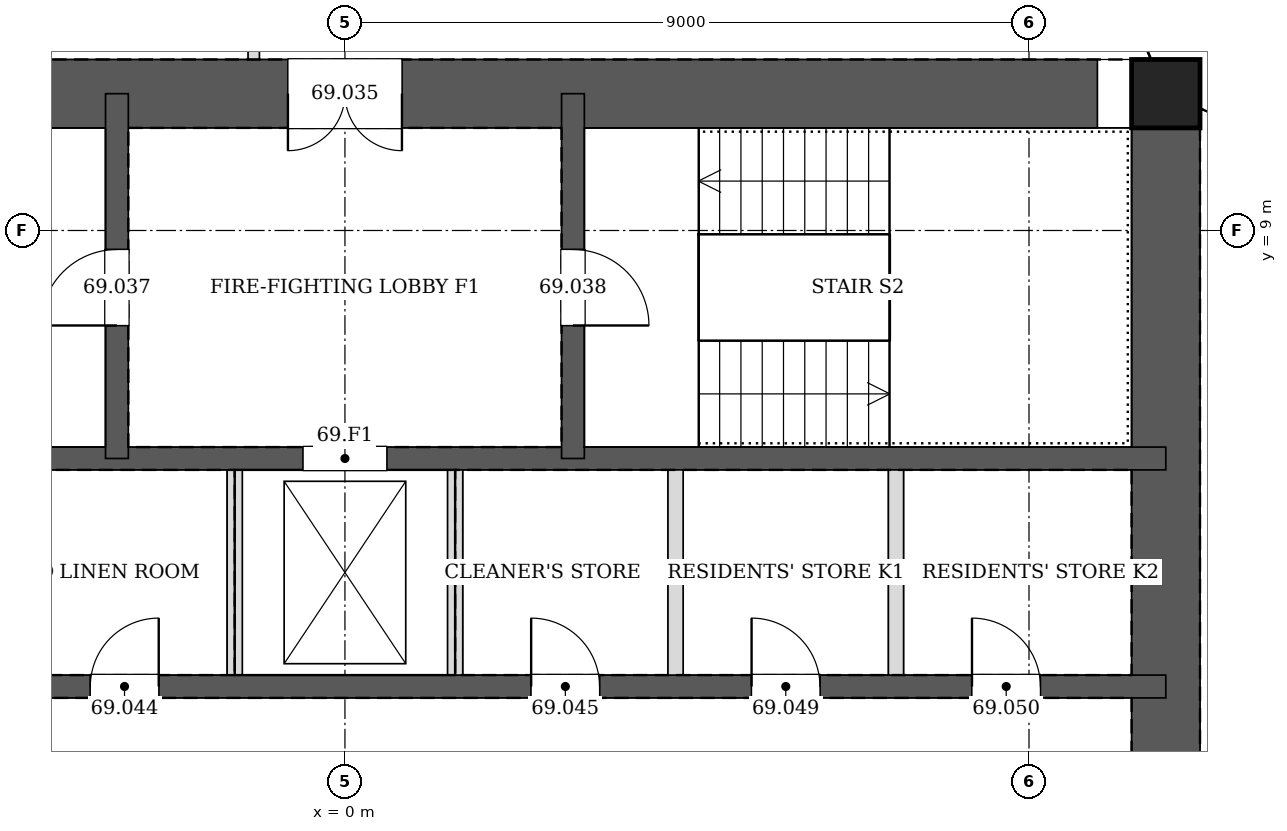
"""IFC4 building model, lengths in metres.
Left out: names, types, materials, properties, quantities, classifications, styles, units other than length and angle.
Written with IfcOpenShell. Run it as: python <this file> out.ifc"""

import sys

from ifc_helpers import new_model, si_unit, direction, frame, frame_2d, origin, origin_2d, place, context, subcontext, project, spatial, rectangle, hollow_rectangle, extrude, element, fill, save


model = new_model("IFC4")
c1 = context("Model", 3, precision=1e-05, world=origin(), true_north=direction((0.0, 1.0)))
c2 = subcontext(c1, "Body", "Model", "MODEL_VIEW")
j1 = project(units=[si_unit("LENGTHUNIT", "METRE"), si_unit("PLANEANGLEUNIT", "RADIAN")], contexts=[c1])
p1 = place(None, origin())
s1 = spatial("IfcSite", under=j1, at=p1, CompositionType="ELEMENT")
p2 = place(p1, origin())
s2 = spatial("IfcBuilding", under=s1, at=p2, CompositionType="ELEMENT")
p3 = place(p2, frame((0.0, 0.0, 284.4)))
s3 = spatial("IfcBuildingStorey", under=s2, at=p3, CompositionType="ELEMENT", Elevation=284.4)
p4 = place(p3, frame((10.8, 10.8, 0.0), z_axis=(0.0, 0.0, 1.0), x_axis=(1.0, 0.0, 0.0)))
e1 = element("IfcColumn", 1, at=p4, inside=s3, PredefinedType="COLUMN", context=c2, shape_type="SweptSolid", body=[
    extrude(hollow_rectangle(XDim=0.9, YDim=0.9, WallThickness=0.04, at=origin_2d()), origin(), (0.0, 0.0, 1.0), 3.4),
])
p5 = place(p3, frame((10.8, -10.8, 0.0), z_axis=(0.0, 0.0, 1.0), x_axis=(0.0, 1.0, 0.0)))
e2 = element("IfcWall", 2, at=p5, inside=s3, PredefinedType="SOLIDWALL", context=c2, shape_type="SweptSolid", body=[
    extrude(rectangle(XDim=21.6, YDim=0.9, at=frame_2d((10.8, 0.0))), origin(), (0.0, 0.0, 1.0), 3.4),
])
p6 = place(p5, frame((11.7, 0.0, 0.0)))
e3 = element("IfcOpeningElement", 3, at=p6, cuts=e2, PredefinedType="OPENING", context=c2, shape_type="SweptSolid", body=[
    extrude(rectangle(XDim=1.2, YDim=2.1, at=frame_2d((0.6, 1.05))), frame((0.0, 0.46, 0.0), z_axis=(0.0, -1.0, 0.0), x_axis=(1.0, 0.0, 0.0)), (0.0, 0.0, 1.0), 0.92),
])
p7 = place(p5, frame((8.7, 0.0, 0.0)))
e4 = element("IfcOpeningElement", 4, at=p7, cuts=e2, PredefinedType="OPENING", context=c2, shape_type="SweptSolid", body=[
    extrude(rectangle(XDim=1.2, YDim=2.1, at=frame_2d((0.6, 1.05))), frame((0.0, 0.46, 0.0), z_axis=(0.0, -1.0, 0.0), x_axis=(1.0, 0.0, 0.0)), (0.0, 0.0, 1.0), 0.92),
])
p8 = place(p3, frame((10.8, 10.8, 0.0), z_axis=(0.0, 0.0, 1.0), x_axis=(-1.0, 0.0, 0.0)))
e5 = element("IfcWall", 5, at=p8, inside=s3, PredefinedType="SOLIDWALL", context=c2, shape_type="SweptSolid", body=[
    extrude(rectangle(XDim=21.6, YDim=0.9, at=frame_2d((10.8, 0.0))), origin(), (0.0, 0.0, 1.0), 3.4),
])
p9 = place(p8, frame((10.05, 0.0, 0.0)))
e6 = element("IfcOpeningElement", 6, at=p9, cuts=e5, PredefinedType="OPENING", context=c2, shape_type="SweptSolid", body=[
    extrude(rectangle(XDim=1.5, YDim=2.1, at=frame_2d((0.75, 1.05))), frame((0.0, 0.46, 0.0), z_axis=(0.0, -1.0, 0.0), x_axis=(1.0, 0.0, 0.0)), (0.0, 0.0, 1.0), 0.92),
])
p10 = place(p3, frame((-10.8, 3.0, 0.0), z_axis=(0.0, 0.0, 1.0), x_axis=(1.0, 0.0, 0.0)))
e7 = element("IfcWall", 7, at=p10, inside=s3, PredefinedType="SOLIDWALL", context=c2, shape_type="SweptSolid", body=[
    extrude(rectangle(XDim=21.6, YDim=0.3, at=frame_2d((10.8, 0.0))), origin(), (0.0, 0.0, 1.0), 3.4),
])
p11 = place(p10, frame((1.65, 0.0, 0.0)))
e8 = element("IfcOpeningElement", 8, at=p11, cuts=e7, PredefinedType="OPENING", context=c2, shape_type="SweptSolid", body=[
    extrude(rectangle(XDim=0.9, YDim=2.1, at=frame_2d((0.45, 1.05))), frame((0.0, 0.16, 0.0), z_axis=(0.0, -1.0, 0.0), x_axis=(1.0, 0.0, 0.0)), (0.0, 0.0, 1.0), 0.32),
])
p12 = place(p10, frame((4.55, 0.0, 0.0)))
e9 = element("IfcOpeningElement", 9, at=p12, cuts=e7, PredefinedType="OPENING", context=c2, shape_type="SweptSolid", body=[
    extrude(rectangle(XDim=0.9, YDim=2.1, at=frame_2d((0.45, 1.05))), frame((0.0, 0.16, 0.0), z_axis=(0.0, -1.0, 0.0), x_axis=(1.0, 0.0, 0.0)), (0.0, 0.0, 1.0), 0.32),
])
p13 = place(p10, frame((7.45, 0.0, 0.0)))
e10 = element("IfcOpeningElement", 10, at=p13, cuts=e7, PredefinedType="OPENING", context=c2, shape_type="SweptSolid", body=[
    extrude(rectangle(XDim=0.9, YDim=2.1, at=frame_2d((0.45, 1.05))), frame((0.0, 0.16, 0.0), z_axis=(0.0, -1.0, 0.0), x_axis=(1.0, 0.0, 0.0)), (0.0, 0.0, 1.0), 0.32),
])
p14 = place(p10, frame((13.25, 0.0, 0.0)))
e11 = element("IfcOpeningElement", 11, at=p14, cuts=e7, PredefinedType="OPENING", context=c2, shape_type="SweptSolid", body=[
    extrude(rectangle(XDim=0.9, YDim=2.1, at=frame_2d((0.45, 1.05))), frame((0.0, 0.16, 0.0), z_axis=(0.0, -1.0, 0.0), x_axis=(1.0, 0.0, 0.0)), (0.0, 0.0, 1.0), 0.32),
])
p15 = place(p10, frame((16.15, 0.0, 0.0)))
e12 = element("IfcOpeningElement", 12, at=p15, cuts=e7, PredefinedType="OPENING", context=c2, shape_type="SweptSolid", body=[
    extrude(rectangle(XDim=0.9, YDim=2.1, at=frame_2d((0.45, 1.05))), frame((0.0, 0.16, 0.0), z_axis=(0.0, -1.0, 0.0), x_axis=(1.0, 0.0, 0.0)), (0.0, 0.0, 1.0), 0.32),
])
p16 = place(p10, frame((19.05, 0.0, 0.0)))
e13 = element("IfcOpeningElement", 13, at=p16, cuts=e7, PredefinedType="OPENING", context=c2, shape_type="SweptSolid", body=[
    extrude(rectangle(XDim=0.9, YDim=2.1, at=frame_2d((0.45, 1.05))), frame((0.0, 0.16, 0.0), z_axis=(0.0, -1.0, 0.0), x_axis=(1.0, 0.0, 0.0)), (0.0, 0.0, 1.0), 0.32),
])
p17 = place(p3, frame((-10.8, 6.0, 0.0), z_axis=(0.0, 0.0, 1.0), x_axis=(1.0, 0.0, 0.0)))
e14 = element("IfcWall", 14, at=p17, inside=s3, PredefinedType="SOLIDWALL", context=c2, shape_type="SweptSolid", body=[
    extrude(rectangle(XDim=21.6, YDim=0.3, at=frame_2d((10.8, 0.0))), origin(), (0.0, 0.0, 1.0), 3.4),
])
p18 = place(p17, frame((10.25, 0.0, 0.0)))
e15 = element("IfcOpeningElement", 15, at=p18, cuts=e14, PredefinedType="OPENING", context=c2, shape_type="SweptSolid", body=[
    extrude(rectangle(XDim=1.1, YDim=2.1, at=frame_2d((0.55, 1.05))), frame((0.0, 0.16, 0.0), z_axis=(0.0, -1.0, 0.0), x_axis=(1.0, 0.0, 0.0)), (0.0, 0.0, 1.0), 0.32),
])
p19 = place(p3, frame((-3.0, 6.0, 0.0), z_axis=(0.0, 0.0, 1.0), x_axis=(0.0, 1.0, 0.0)))
e16 = element("IfcWall", 16, at=p19, inside=s3, PredefinedType="SOLIDWALL", context=c2, shape_type="SweptSolid", body=[
    extrude(rectangle(XDim=4.8, YDim=0.3, at=frame_2d((2.4, 0.0))), origin(), (0.0, 0.0, 1.0), 3.4),
])
p20 = place(p19, frame((1.75, 0.0, 0.0)))
e17 = element("IfcOpeningElement", 17, at=p20, cuts=e16, PredefinedType="OPENING", context=c2, shape_type="SweptSolid", body=[
    extrude(rectangle(XDim=1.0, YDim=2.1, at=frame_2d((0.5, 1.05))), frame((0.0, 0.16, 0.0), z_axis=(0.0, -1.0, 0.0), x_axis=(1.0, 0.0, 0.0)), (0.0, 0.0, 1.0), 0.32),
])
p21 = place(p3, frame((3.0, 6.0, 0.0), z_axis=(0.0, 0.0, 1.0), x_axis=(0.0, 1.0, 0.0)))
e18 = element("IfcWall", 18, at=p21, inside=s3, PredefinedType="SOLIDWALL", context=c2, shape_type="SweptSolid", body=[
    extrude(rectangle(XDim=4.8, YDim=0.3, at=frame_2d((2.4, 0.0))), origin(), (0.0, 0.0, 1.0), 3.4),
])
p22 = place(p21, frame((1.75, 0.0, 0.0)))
e19 = element("IfcOpeningElement", 19, at=p22, cuts=e18, PredefinedType="OPENING", context=c2, shape_type="SweptSolid", body=[
    extrude(rectangle(XDim=1.0, YDim=2.1, at=frame_2d((0.5, 1.05))), frame((0.0, 0.16, 0.0), z_axis=(0.0, -1.0, 0.0), x_axis=(1.0, 0.0, 0.0)), (0.0, 0.0, 1.0), 0.32),
])
p23 = place(p3, frame((-1.2, 13.05, 0.0), z_axis=(0.0, 0.0, 1.0), x_axis=(0.0, -1.0, 0.0)))
e20 = element("IfcWall", 20, at=p23, inside=s3, PredefinedType="PARTITIONING", context=c2, shape_type="SweptSolid", body=[
    extrude(rectangle(XDim=1.8, YDim=0.15, at=frame_2d((0.9, 0.0))), origin(), (0.0, 0.0, 1.0), 3.2),
])
p24 = place(p23, frame((0.425, 0.0, 0.0)))
e21 = element("IfcOpeningElement", 21, at=p24, cuts=e20, PredefinedType="OPENING", context=c2, shape_type="SweptSolid", body=[
    extrude(rectangle(XDim=0.95, YDim=2.1, at=frame_2d((0.475, 1.05))), frame((0.0, 0.085, 0.0), z_axis=(0.0, -1.0, 0.0), x_axis=(1.0, 0.0, 0.0)), (0.0, 0.0, 1.0), 0.17),
])
for number, where, z_axis, x_axis in (
    (22, (-1.45, 3.15, 0.0), (0.0, 0.0, 1.0), (0.0, 1.0, 0.0)),
    (23, (1.45, 3.15, 0.0), (0.0, 0.0, 1.0), (0.0, 1.0, 0.0)),
    (24, (4.35, 3.15, 0.0), (0.0, 0.0, 1.0), (0.0, 1.0, 0.0)),
    (25, (7.25, 3.15, 0.0), (0.0, 0.0, 1.0), (0.0, 1.0, 0.0)),
):
    element("IfcWall", number, at=place(p3, frame(where, z_axis=z_axis, x_axis=x_axis)), inside=s3, PredefinedType="PARTITIONING", context=c2, shape_type="SweptSolid", body=[
        extrude(rectangle(XDim=2.7, YDim=0.2, at=frame_2d((1.35, 0.0))), origin(), (0.0, 0.0, 1.0), 3.2),
    ])
p25 = place(p9, origin())
e26 = element("IfcDoor", 26, at=p25, inside=s3, OperationType="DOUBLE_DOOR_SINGLE_SWING", PredefinedType="DOOR", context=c2, shape_type="SweptSolid", body=[
    extrude(rectangle(XDim=1.5, YDim=2.1, at=frame_2d((0.75, 1.05))), frame((0.0, 0.025, 0.0), z_axis=(0.0, -1.0, 0.0), x_axis=(1.0, 0.0, 0.0)), (0.0, 0.0, 1.0), 0.05),
])
fill(e6, e26)
p26 = place(p20, origin())
e27 = element("IfcDoor", 27, at=p26, inside=s3, OperationType="SINGLE_SWING_LEFT", PredefinedType="DOOR", context=c2, shape_type="SweptSolid", body=[
    extrude(rectangle(XDim=1.0, YDim=2.1, at=frame_2d((0.5, 1.05))), frame((0.0, 0.025, 0.0), z_axis=(0.0, -1.0, 0.0), x_axis=(1.0, 0.0, 0.0)), (0.0, 0.0, 1.0), 0.05),
])
fill(e17, e27)
p27 = place(p22, frame((1.0, 0.0, 0.0), z_axis=(0.0, 0.0, 1.0), x_axis=(-1.0, 0.0, 0.0)))
e28 = element("IfcDoor", 28, at=p27, inside=s3, OperationType="SINGLE_SWING_RIGHT", PredefinedType="DOOR", context=c2, shape_type="SweptSolid", body=[
    extrude(rectangle(XDim=1.0, YDim=2.1, at=frame_2d((0.5, 1.05))), frame((0.0, 0.025, 0.0), z_axis=(0.0, -1.0, 0.0), x_axis=(1.0, 0.0, 0.0)), (0.0, 0.0, 1.0), 0.05),
])
fill(e19, e28)
p28 = place(p13, origin())
e29 = element("IfcDoor", 29, at=p28, inside=s3, OperationType="SINGLE_SWING_RIGHT", PredefinedType="DOOR", context=c2, shape_type="SweptSolid", body=[
    extrude(rectangle(XDim=0.9, YDim=2.1, at=frame_2d((0.45, 1.05))), frame((0.0, 0.025, 0.0), z_axis=(0.0, -1.0, 0.0), x_axis=(1.0, 0.0, 0.0)), (0.0, 0.0, 1.0), 0.05),
])
fill(e10, e29)
p29 = place(p14, origin())
e30 = element("IfcDoor", 30, at=p29, inside=s3, OperationType="SINGLE_SWING_LEFT", PredefinedType="DOOR", context=c2, shape_type="SweptSolid", body=[
    extrude(rectangle(XDim=0.9, YDim=2.1, at=frame_2d((0.45, 1.05))), frame((0.0, 0.025, 0.0), z_axis=(0.0, -1.0, 0.0), x_axis=(1.0, 0.0, 0.0)), (0.0, 0.0, 1.0), 0.05),
])
fill(e11, e30)
p30 = place(p15, origin())
e31 = element("IfcDoor", 31, at=p30, inside=s3, OperationType="SINGLE_SWING_LEFT", PredefinedType="DOOR", context=c2, shape_type="SweptSolid", body=[
    extrude(rectangle(XDim=0.9, YDim=2.1, at=frame_2d((0.45, 1.05))), frame((0.0, 0.025, 0.0), z_axis=(0.0, -1.0, 0.0), x_axis=(1.0, 0.0, 0.0)), (0.0, 0.0, 1.0), 0.05),
])
fill(e12, e31)
p31 = place(p16, origin())
e32 = element("IfcDoor", 32, at=p31, inside=s3, OperationType="SINGLE_SWING_LEFT", PredefinedType="DOOR", context=c2, shape_type="SweptSolid", body=[
    extrude(rectangle(XDim=0.9, YDim=2.1, at=frame_2d((0.45, 1.05))), frame((0.0, 0.025, 0.0), z_axis=(0.0, -1.0, 0.0), x_axis=(1.0, 0.0, 0.0)), (0.0, 0.0, 1.0), 0.05),
])
fill(e13, e32)
p32 = place(p18, origin())
e33 = element("IfcDoor", 33, at=p32, inside=s3, OperationType="DOUBLE_DOOR_SLIDING", PredefinedType="DOOR", context=c2, shape_type="SweptSolid", body=[
    extrude(rectangle(XDim=1.1, YDim=2.1, at=frame_2d((0.55, 1.05))), frame((0.0, 0.025, 0.0), z_axis=(0.0, -1.0, 0.0), x_axis=(1.0, 0.0, 0.0)), (0.0, 0.0, 1.0), 0.05),
])
fill(e15, e33)
save(model, sys.argv[1])
